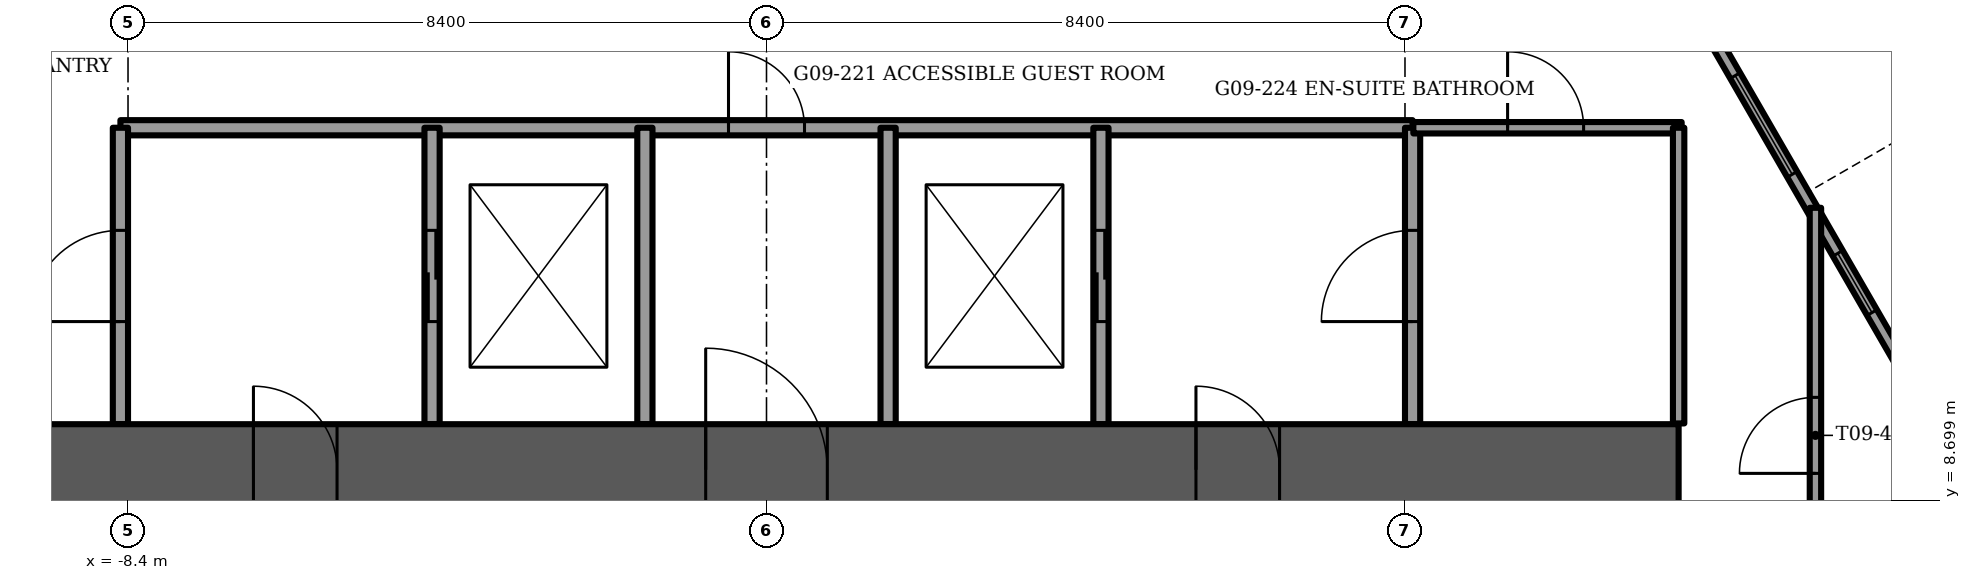
"""IFC4 building model, lengths in metres.
Left out: names, types, materials, properties, quantities, classifications, styles, units other than length and angle.
Written with IfcOpenShell. Run it as: python <this file> out.ifc"""

import sys

from ifc_helpers import new_model, si_unit, direction, frame, frame_2d, origin, place, context, subcontext, project, spatial, rectangle, extrude, element, fill, save


model = new_model("IFC4")
c1 = context("Model", 3, precision=1e-05, world=origin(), true_north=direction((0.0, 1.0)))
c2 = subcontext(c1, "Body", "Model", "MODEL_VIEW")
j1 = project(units=[si_unit("LENGTHUNIT", "METRE"), si_unit("PLANEANGLEUNIT", "RADIAN")], contexts=[c1])
p1 = place(None, origin())
s1 = spatial("IfcSite", under=j1, at=p1, CompositionType="ELEMENT")
p2 = place(p1, origin())
s2 = spatial("IfcBuilding", under=s1, at=p2, CompositionType="ELEMENT")
p3 = place(p2, frame((0.0, 0.0, 39.25)))
s3 = spatial("IfcBuildingStorey", under=s2, at=p3, CompositionType="ELEMENT", Elevation=39.25)
p4 = place(p3, frame((-12.0, 9.1, -0.3), z_axis=(0.0, 0.0, 1.0), x_axis=(1.0, 0.0, 0.0)))
e1 = element("IfcWall", 1, at=p4, inside=s3, PredefinedType="SHEAR", context=c2, shape_type="SweptSolid", body=[
    extrude(rectangle(XDim=24.0, YDim=1.2, at=frame_2d((12.0, 0.0))), origin(), (0.0, 0.0, 1.0), 3.75),
])
p5 = place(p4, frame((11.2, 0.0, 0.0)))
e2 = element("IfcOpeningElement", 2, at=p5, cuts=e1, PredefinedType="OPENING", context=c2, shape_type="SweptSolid", body=[
    extrude(rectangle(XDim=1.6, YDim=2.1, at=frame_2d((0.8, 1.05))), frame((0.0, 0.6, 0.0), z_axis=(0.0, -1.0, 0.0), x_axis=(1.0, 0.0, 0.0)), (0.0, 0.0, 1.0), 1.2),
])
p6 = place(p4, frame((5.25, 0.0, 0.0)))
e3 = element("IfcOpeningElement", 3, at=p6, cuts=e1, PredefinedType="OPENING", context=c2, shape_type="SweptSolid", body=[
    extrude(rectangle(XDim=1.1, YDim=2.1, at=frame_2d((0.55, 1.05))), frame((0.0, 0.6, 0.0), z_axis=(0.0, -1.0, 0.0), x_axis=(1.0, 0.0, 0.0)), (0.0, 0.0, 1.0), 1.2),
])
p7 = place(p4, frame((17.65, 0.0, 0.0)))
e4 = element("IfcOpeningElement", 4, at=p7, cuts=e1, PredefinedType="OPENING", context=c2, shape_type="SweptSolid", body=[
    extrude(rectangle(XDim=1.1, YDim=2.1, at=frame_2d((0.55, 1.05))), frame((0.0, 0.6, 0.0), z_axis=(0.0, -1.0, 0.0), x_axis=(1.0, 0.0, 0.0)), (0.0, 0.0, 1.0), 1.2),
])
p8 = place(p3, frame((15.844, 14.766, 0.0), z_axis=(0.0, 0.0, 1.0), x_axis=(-0.499994135611, 0.866028789565, 0.0)))
e5 = element("IfcWall", 5, at=p8, inside=s3, PredefinedType="PARAPET", context=c2, shape_type="SweptSolid", body=[
    extrude(rectangle(XDim=6.845, YDim=0.9, at=frame_2d((3.423, 0.0))), origin(), (0.0, 0.0, 1.0), 1.1),
])
p9 = place(p3, frame((-9.276, 20.292, 0.0), z_axis=(0.0, 0.0, 1.0), x_axis=(-0.500006057782, -0.866021906294, 0.0)))
e6 = element("IfcWall", 6, at=p9, inside=s3, PredefinedType="SOLIDWALL", context=c2, shape_type="SweptSolid", body=[
    extrude(rectangle(XDim=23.1, YDim=0.15, at=frame_2d((11.55, 0.0))), origin(), (0.0, 0.0, 1.0), 3.45),
])
p10 = place(p9, frame((2.736, 0.0, 0.15)))
e7 = element("IfcOpeningElement", 7, at=p10, cuts=e6, PredefinedType="OPENING", context=c2, shape_type="SweptSolid", body=[
    extrude(rectangle(XDim=0.9, YDim=2.85, at=frame_2d((0.45, 1.425))), frame((0.0, 0.075, 0.0), z_axis=(0.0, -1.0, 0.0), x_axis=(1.0, 0.0, 0.0)), (0.0, 0.0, 1.0), 0.15),
])
p11 = place(p9, frame((3.825, 0.0, 0.15)))
e8 = element("IfcOpeningElement", 8, at=p11, cuts=e6, PredefinedType="OPENING", context=c2, shape_type="SweptSolid", body=[
    extrude(rectangle(XDim=1.5, YDim=2.85, at=frame_2d((0.75, 1.425))), frame((0.0, 0.075, 0.0), z_axis=(0.0, -1.0, 0.0), x_axis=(1.0, 0.0, 0.0)), (0.0, 0.0, 1.0), 0.15),
])
p12 = place(p9, frame((9.32, 0.0, 0.15)))
e9 = element("IfcOpeningElement", 9, at=p12, cuts=e6, PredefinedType="OPENING", context=c2, shape_type="SweptSolid", body=[
    extrude(rectangle(XDim=0.9, YDim=2.85, at=frame_2d((0.45, 1.425))), frame((0.0, 0.075, 0.0), z_axis=(0.0, -1.0, 0.0), x_axis=(1.0, 0.0, 0.0)), (0.0, 0.0, 1.0), 0.15),
])
p13 = place(p9, frame((7.12, 0.0, 0.15)))
e10 = element("IfcOpeningElement", 10, at=p13, cuts=e6, PredefinedType="OPENING", context=c2, shape_type="SweptSolid", body=[
    extrude(rectangle(XDim=1.5, YDim=2.85, at=frame_2d((0.75, 1.425))), frame((0.0, 0.075, 0.0), z_axis=(0.0, -1.0, 0.0), x_axis=(1.0, 0.0, 0.0)), (0.0, 0.0, 1.0), 0.15),
])
p14 = place(p9, frame((11.136, 0.0, 0.15)))
e11 = element("IfcOpeningElement", 11, at=p14, cuts=e6, PredefinedType="OPENING", context=c2, shape_type="SweptSolid", body=[
    extrude(rectangle(XDim=1.8, YDim=2.85, at=frame_2d((0.9, 1.425))), frame((0.0, 0.075, 0.0), z_axis=(0.0, -1.0, 0.0), x_axis=(1.0, 0.0, 0.0)), (0.0, 0.0, 1.0), 0.15),
])
p15 = place(p9, frame((13.236, 0.0, 0.15)))
e12 = element("IfcOpeningElement", 12, at=p15, cuts=e6, PredefinedType="OPENING", context=c2, shape_type="SweptSolid", body=[
    extrude(rectangle(XDim=1.5, YDim=2.85, at=frame_2d((0.75, 1.425))), frame((0.0, 0.075, 0.0), z_axis=(0.0, -1.0, 0.0), x_axis=(1.0, 0.0, 0.0)), (0.0, 0.0, 1.0), 0.15),
])
p16 = place(p9, frame((16.18, 0.0, 0.15)))
e13 = element("IfcOpeningElement", 13, at=p16, cuts=e6, PredefinedType="OPENING", context=c2, shape_type="SweptSolid", body=[
    extrude(rectangle(XDim=1.5, YDim=2.85, at=frame_2d((0.75, 1.425))), frame((0.0, 0.075, 0.0), z_axis=(0.0, -1.0, 0.0), x_axis=(1.0, 0.0, 0.0)), (0.0, 0.0, 1.0), 0.15),
])
p17 = place(p9, frame((0.44, 0.0, 0.15)))
e14 = element("IfcOpeningElement", 14, at=p17, cuts=e6, PredefinedType="OPENING", context=c2, shape_type="SweptSolid", body=[
    extrude(rectangle(XDim=0.9, YDim=2.73, at=frame_2d((0.45, 1.365))), frame((0.0, 0.075, 0.0), z_axis=(0.0, -1.0, 0.0), x_axis=(1.0, 0.0, 0.0)), (0.0, 0.0, 1.0), 0.15),
])
p18 = place(p9, frame((20.978, 0.0, 0.15)))
e15 = element("IfcOpeningElement", 15, at=p18, cuts=e6, PredefinedType="OPENING", context=c2, shape_type="SweptSolid", body=[
    extrude(rectangle(XDim=1.8, YDim=2.73, at=frame_2d((0.9, 1.365))), frame((0.0, 0.075, 0.0), z_axis=(0.0, -1.0, 0.0), x_axis=(1.0, 0.0, 0.0)), (0.0, 0.0, 1.0), 0.15),
])
p19 = place(p3, frame((20.826, 0.287, 0.0), z_axis=(0.0, 0.0, 1.0), x_axis=(-0.500006057782, 0.866021906294, 0.0)))
e16 = element("IfcWall", 16, at=p19, inside=s3, PredefinedType="SOLIDWALL", context=c2, shape_type="SweptSolid", body=[
    extrude(rectangle(XDim=23.1, YDim=0.15, at=frame_2d((11.55, 0.0))), origin(), (0.0, 0.0, 1.0), 3.45),
])
p20 = place(p19, frame((4.165, 0.0, 0.15)))
e17 = element("IfcOpeningElement", 17, at=p20, cuts=e16, PredefinedType="OPENING", context=c2, shape_type="SweptSolid", body=[
    extrude(rectangle(XDim=0.9, YDim=2.85, at=frame_2d((0.45, 1.425))), frame((0.0, 0.075, 0.0), z_axis=(0.0, -1.0, 0.0), x_axis=(1.0, 0.0, 0.0)), (0.0, 0.0, 1.0), 0.15),
])
p21 = place(p19, frame((5.645, 0.0, 0.15)))
e18 = element("IfcOpeningElement", 18, at=p21, cuts=e16, PredefinedType="OPENING", context=c2, shape_type="SweptSolid", body=[
    extrude(rectangle(XDim=1.5, YDim=2.85, at=frame_2d((0.75, 1.425))), frame((0.0, 0.075, 0.0), z_axis=(0.0, -1.0, 0.0), x_axis=(1.0, 0.0, 0.0)), (0.0, 0.0, 1.0), 0.15),
])
p22 = place(p19, frame((8.365, 0.0, 0.15)))
e19 = element("IfcOpeningElement", 19, at=p22, cuts=e16, PredefinedType="OPENING", context=c2, shape_type="SweptSolid", body=[
    extrude(rectangle(XDim=1.8, YDim=2.85, at=frame_2d((0.9, 1.425))), frame((0.0, 0.075, 0.0), z_axis=(0.0, -1.0, 0.0), x_axis=(1.0, 0.0, 0.0)), (0.0, 0.0, 1.0), 0.15),
])
p23 = place(p19, frame((10.465, 0.0, 0.15)))
e20 = element("IfcOpeningElement", 20, at=p23, cuts=e16, PredefinedType="OPENING", context=c2, shape_type="SweptSolid", body=[
    extrude(rectangle(XDim=1.5, YDim=2.85, at=frame_2d((0.75, 1.425))), frame((0.0, 0.075, 0.0), z_axis=(0.0, -1.0, 0.0), x_axis=(1.0, 0.0, 0.0)), (0.0, 0.0, 1.0), 0.15),
])
p24 = place(p19, frame((12.564, 0.0, 0.15)))
e21 = element("IfcOpeningElement", 21, at=p24, cuts=e16, PredefinedType="OPENING", context=c2, shape_type="SweptSolid", body=[
    extrude(rectangle(XDim=0.9, YDim=2.85, at=frame_2d((0.45, 1.425))), frame((0.0, 0.075, 0.0), z_axis=(0.0, -1.0, 0.0), x_axis=(1.0, 0.0, 0.0)), (0.0, 0.0, 1.0), 0.15),
])
p25 = place(p19, frame((14.665, 0.0, 0.15)))
e22 = element("IfcOpeningElement", 22, at=p25, cuts=e16, PredefinedType="OPENING", context=c2, shape_type="SweptSolid", body=[
    extrude(rectangle(XDim=1.5, YDim=2.85, at=frame_2d((0.75, 1.425))), frame((0.0, 0.075, 0.0), z_axis=(0.0, -1.0, 0.0), x_axis=(1.0, 0.0, 0.0)), (0.0, 0.0, 1.0), 0.15),
])
p26 = place(p19, frame((17.775, 0.0, 0.15)))
e23 = element("IfcOpeningElement", 23, at=p26, cuts=e16, PredefinedType="OPENING", context=c2, shape_type="SweptSolid", body=[
    extrude(rectangle(XDim=0.9, YDim=2.85, at=frame_2d((0.45, 1.425))), frame((0.0, 0.075, 0.0), z_axis=(0.0, -1.0, 0.0), x_axis=(1.0, 0.0, 0.0)), (0.0, 0.0, 1.0), 0.15),
])
p27 = place(p19, frame((18.865, 0.0, 0.0)))
e24 = element("IfcOpeningElement", 24, at=p27, cuts=e16, PredefinedType="OPENING", context=c2, shape_type="SweptSolid", body=[
    extrude(rectangle(XDim=1.5, YDim=2.4, at=frame_2d((0.75, 1.2))), frame((0.0, 0.075, 0.0), z_axis=(0.0, -1.0, 0.0), x_axis=(1.0, 0.0, 0.0)), (0.0, 0.0, 1.0), 0.15),
])
p28 = place(p19, frame((0.322, 0.0, 0.15)))
e25 = element("IfcOpeningElement", 25, at=p28, cuts=e16, PredefinedType="OPENING", context=c2, shape_type="SweptSolid", body=[
    extrude(rectangle(XDim=1.8, YDim=2.73, at=frame_2d((0.9, 1.365))), frame((0.0, 0.075, 0.0), z_axis=(0.0, -1.0, 0.0), x_axis=(1.0, 0.0, 0.0)), (0.0, 0.0, 1.0), 0.15),
])
p29 = place(p19, frame((21.032, 0.0, 0.15)))
e26 = element("IfcOpeningElement", 26, at=p29, cuts=e16, PredefinedType="OPENING", context=c2, shape_type="SweptSolid", body=[
    extrude(rectangle(XDim=1.8, YDim=2.73, at=frame_2d((0.9, 1.365))), frame((0.0, 0.075, 0.0), z_axis=(0.0, -1.0, 0.0), x_axis=(1.0, 0.0, 0.0)), (0.0, 0.0, 1.0), 0.15),
])
p30 = place(p3, frame((-8.5, 13.6, 0.0), z_axis=(0.0, 0.0, 1.0), x_axis=(1.0, 0.0, 0.0)))
e27 = element("IfcWall", 27, at=p30, inside=s3, PredefinedType="PARTITIONING", context=c2, shape_type="SweptSolid", body=[
    extrude(rectangle(XDim=17.0, YDim=0.2, at=frame_2d((8.5, 0.0))), origin(), (0.0, 0.0, 1.0), 3.45),
])
p31 = place(p30, frame((8.0, 0.0, 0.0)))
e28 = element("IfcOpeningElement", 28, at=p31, cuts=e27, PredefinedType="OPENING", context=c2, shape_type="SweptSolid", body=[
    extrude(rectangle(XDim=1.0, YDim=2.1, at=frame_2d((0.5, 1.05))), frame((0.0, 0.1, 0.0), z_axis=(0.0, -1.0, 0.0), x_axis=(1.0, 0.0, 0.0)), (0.0, 0.0, 1.0), 0.2),
])
p32 = place(p3, frame((-8.5, 9.7, 0.0), z_axis=(0.0, 0.0, 1.0), x_axis=(0.0, 1.0, 0.0)))
e29 = element("IfcWall", 29, at=p32, inside=s3, PredefinedType="PARTITIONING", context=c2, shape_type="SweptSolid", body=[
    extrude(rectangle(XDim=3.9, YDim=0.2, at=frame_2d((1.95, 0.0))), origin(), (0.0, 0.0, 1.0), 3.45),
])
p33 = place(p32, frame((1.35, 0.0, 0.0)))
e30 = element("IfcOpeningElement", 30, at=p33, cuts=e29, PredefinedType="OPENING", context=c2, shape_type="SweptSolid", body=[
    extrude(rectangle(XDim=1.2, YDim=2.1, at=frame_2d((0.6, 1.05))), frame((0.0, 0.1, 0.0), z_axis=(0.0, -1.0, 0.0), x_axis=(1.0, 0.0, 0.0)), (0.0, 0.0, 1.0), 0.2),
])
p34 = place(p3, frame((8.5, 9.7, 0.0), z_axis=(0.0, 0.0, 1.0), x_axis=(0.0, 1.0, 0.0)))
e31 = element("IfcWall", 31, at=p34, inside=s3, PredefinedType="PARTITIONING", context=c2, shape_type="SweptSolid", body=[
    extrude(rectangle(XDim=3.9, YDim=0.2, at=frame_2d((1.95, 0.0))), origin(), (0.0, 0.0, 1.0), 3.45),
])
p35 = place(p34, frame((1.35, 0.0, 0.0)))
e32 = element("IfcOpeningElement", 32, at=p35, cuts=e31, PredefinedType="OPENING", context=c2, shape_type="SweptSolid", body=[
    extrude(rectangle(XDim=1.2, YDim=2.1, at=frame_2d((0.6, 1.05))), frame((0.0, 0.1, 0.0), z_axis=(0.0, -1.0, 0.0), x_axis=(1.0, 0.0, 0.0)), (0.0, 0.0, 1.0), 0.2),
])
p36 = place(p3, frame((-4.4, 9.7, 0.0), z_axis=(0.0, 0.0, 1.0), x_axis=(0.0, 1.0, 0.0)))
e33 = element("IfcWall", 33, at=p36, inside=s3, PredefinedType="PARTITIONING", context=c2, shape_type="SweptSolid", body=[
    extrude(rectangle(XDim=3.9, YDim=0.2, at=frame_2d((1.95, 0.0))), origin(), (0.0, 0.0, 1.0), 3.45),
])
p37 = place(p36, frame((1.35, 0.0, 0.0)))
e34 = element("IfcOpeningElement", 34, at=p37, cuts=e33, PredefinedType="OPENING", context=c2, shape_type="SweptSolid", body=[
    extrude(rectangle(XDim=1.2, YDim=2.1, at=frame_2d((0.6, 1.05))), frame((0.0, 0.1, 0.0), z_axis=(0.0, -1.0, 0.0), x_axis=(1.0, 0.0, 0.0)), (0.0, 0.0, 1.0), 0.2),
])
p38 = place(p3, frame((4.4, 9.7, 0.0), z_axis=(0.0, 0.0, 1.0), x_axis=(0.0, 1.0, 0.0)))
e35 = element("IfcWall", 35, at=p38, inside=s3, PredefinedType="PARTITIONING", context=c2, shape_type="SweptSolid", body=[
    extrude(rectangle(XDim=3.9, YDim=0.2, at=frame_2d((1.95, 0.0))), origin(), (0.0, 0.0, 1.0), 3.45),
])
p39 = place(p38, frame((1.35, 0.0, 0.0)))
e36 = element("IfcOpeningElement", 36, at=p39, cuts=e35, PredefinedType="OPENING", context=c2, shape_type="SweptSolid", body=[
    extrude(rectangle(XDim=1.2, YDim=2.1, at=frame_2d((0.6, 1.05))), frame((0.0, 0.1, 0.0), z_axis=(0.0, -1.0, 0.0), x_axis=(1.0, 0.0, 0.0)), (0.0, 0.0, 1.0), 0.2),
])
for number, where, z_axis, x_axis in (
    (37, (-1.6, 9.7, 0.0), (0.0, 0.0, 1.0), (0.0, 1.0, 0.0)),
    (38, (1.6, 9.7, 0.0), (0.0, 0.0, 1.0), (0.0, 1.0, 0.0)),
):
    element("IfcWall", number, at=place(p3, frame(where, z_axis=z_axis, x_axis=x_axis)), inside=s3, PredefinedType="PARTITIONING", context=c2, shape_type="SweptSolid", body=[
        extrude(rectangle(XDim=3.9, YDim=0.2, at=frame_2d((1.95, 0.0))), origin(), (0.0, 0.0, 1.0), 3.45),
    ])
p40 = place(p3, frame((8.51, 13.6, 0.0), z_axis=(0.0, 0.0, 1.0), x_axis=(1.0, 0.0, 0.0)))
e39 = element("IfcWall", 39, at=p40, inside=s3, PredefinedType="PARTITIONING", context=c2, shape_type="SweptSolid", body=[
    extrude(rectangle(XDim=3.53, YDim=0.15, at=frame_2d((1.765, 0.0))), origin(), (0.0, 0.0, 1.0), 3.45),
])
p41 = place(p40, frame((1.24, 0.0, 0.0)))
e40 = element("IfcOpeningElement", 40, at=p41, cuts=e39, PredefinedType="OPENING", context=c2, shape_type="SweptSolid", body=[
    extrude(rectangle(XDim=1.0, YDim=2.1, at=frame_2d((0.5, 1.05))), frame((0.0, 0.075, 0.0), z_axis=(0.0, -1.0, 0.0), x_axis=(1.0, 0.0, 0.0)), (0.0, 0.0, 1.0), 0.15),
])
p42 = place(p3, frame((13.8, -3.7, 0.0), z_axis=(0.0, 0.0, 1.0), x_axis=(0.0, 1.0, 0.0)))
e41 = element("IfcWall", 41, at=p42, inside=s3, PredefinedType="PARTITIONING", context=c2, shape_type="SweptSolid", body=[
    extrude(rectangle(XDim=16.247, YDim=0.15, at=frame_2d((8.124, 0.0))), origin(), (0.0, 0.0, 1.0), 3.45),
])
p43 = place(p42, frame((1.705, 0.0, 0.0)))
e42 = element("IfcOpeningElement", 42, at=p43, cuts=e41, PredefinedType="OPENING", context=c2, shape_type="SweptSolid", body=[
    extrude(rectangle(XDim=1.0, YDim=2.1, at=frame_2d((0.5, 1.05))), frame((0.0, 0.075, 0.0), z_axis=(0.0, -1.0, 0.0), x_axis=(1.0, 0.0, 0.0)), (0.0, 0.0, 1.0), 0.15),
])
p44 = place(p42, frame((7.9, 0.0, 0.0)))
e43 = element("IfcOpeningElement", 43, at=p44, cuts=e41, PredefinedType="OPENING", context=c2, shape_type="SweptSolid", body=[
    extrude(rectangle(XDim=1.0, YDim=2.1, at=frame_2d((0.5, 1.05))), frame((0.0, 0.075, 0.0), z_axis=(0.0, -1.0, 0.0), x_axis=(1.0, 0.0, 0.0)), (0.0, 0.0, 1.0), 0.15),
])
p45 = place(p42, frame((12.753, 0.0, 0.0)))
e44 = element("IfcOpeningElement", 44, at=p45, cuts=e41, PredefinedType="OPENING", context=c2, shape_type="SweptSolid", body=[
    extrude(rectangle(XDim=1.0, YDim=2.1, at=frame_2d((0.5, 1.05))), frame((0.0, 0.075, 0.0), z_axis=(0.0, -1.0, 0.0), x_axis=(1.0, 0.0, 0.0)), (0.0, 0.0, 1.0), 0.15),
])
p46 = place(p3, frame((12.0, 9.71, 0.0), z_axis=(0.0, 0.0, 1.0), x_axis=(0.0, 1.0, 0.0)))
e45 = element("IfcWall", 45, at=p46, inside=s3, PredefinedType="PARTITIONING", context=c2, shape_type="SweptSolid", body=[
    extrude(rectangle(XDim=3.89, YDim=0.15, at=frame_2d((1.945, 0.0))), origin(), (0.0, 0.0, 1.0), 3.45),
])
p47 = place(p24, origin())
e46 = element("IfcWindow", 46, at=p47, inside=s3, PartitioningType="SINGLE_PANEL", PredefinedType="WINDOW", context=c2, shape_type="SweptSolid", body=[
    extrude(rectangle(XDim=0.9, YDim=2.85, at=frame_2d((0.45, 1.425))), frame((0.0, 0.03, 0.0), z_axis=(0.0, -1.0, 0.0), x_axis=(1.0, 0.0, 0.0)), (0.0, 0.0, 1.0), 0.06),
])
fill(e21, e46)
p48 = place(p25, origin())
e47 = element("IfcWindow", 47, at=p48, inside=s3, PartitioningType="SINGLE_PANEL", PredefinedType="WINDOW", context=c2, shape_type="SweptSolid", body=[
    extrude(rectangle(XDim=1.5, YDim=2.85, at=frame_2d((0.75, 1.425))), frame((0.0, 0.03, 0.0), z_axis=(0.0, -1.0, 0.0), x_axis=(1.0, 0.0, 0.0)), (0.0, 0.0, 1.0), 0.06),
])
fill(e22, e47)
p49 = place(p5, origin())
e48 = element("IfcDoor", 48, at=p49, inside=s3, OperationType="DOUBLE_DOOR_SINGLE_SWING", PredefinedType="DOOR", context=c2, shape_type="SweptSolid", body=[
    extrude(rectangle(XDim=1.6, YDim=2.1, at=frame_2d((0.8, 1.05))), frame((0.0, 0.025, 0.0), z_axis=(0.0, -1.0, 0.0), x_axis=(1.0, 0.0, 0.0)), (0.0, 0.0, 1.0), 0.05),
])
fill(e2, e48)
p50 = place(p6, origin())
e49 = element("IfcDoor", 49, at=p50, inside=s3, OperationType="SINGLE_SWING_LEFT", PredefinedType="DOOR", context=c2, shape_type="SweptSolid", body=[
    extrude(rectangle(XDim=1.1, YDim=2.1, at=frame_2d((0.55, 1.05))), frame((0.0, 0.025, 0.0), z_axis=(0.0, -1.0, 0.0), x_axis=(1.0, 0.0, 0.0)), (0.0, 0.0, 1.0), 0.05),
])
fill(e3, e49)
p51 = place(p7, origin())
e50 = element("IfcDoor", 50, at=p51, inside=s3, OperationType="SINGLE_SWING_RIGHT", PredefinedType="DOOR", context=c2, shape_type="SweptSolid", body=[
    extrude(rectangle(XDim=1.1, YDim=2.1, at=frame_2d((0.55, 1.05))), frame((0.0, 0.025, 0.0), z_axis=(0.0, -1.0, 0.0), x_axis=(1.0, 0.0, 0.0)), (0.0, 0.0, 1.0), 0.05),
])
fill(e4, e50)
p52 = place(p37, origin())
e51 = element("IfcDoor", 51, at=p52, inside=s3, OperationType="SLIDING_TO_LEFT", PredefinedType="DOOR", context=c2, shape_type="SweptSolid", body=[
    extrude(rectangle(XDim=1.2, YDim=2.1, at=frame_2d((0.6, 1.05))), frame((0.0, 0.025, 0.0), z_axis=(0.0, -1.0, 0.0), x_axis=(1.0, 0.0, 0.0)), (0.0, 0.0, 1.0), 0.05),
])
fill(e34, e51)
p53 = place(p33, origin())
e52 = element("IfcDoor", 52, at=p53, inside=s3, OperationType="SINGLE_SWING_LEFT", PredefinedType="DOOR", context=c2, shape_type="SweptSolid", body=[
    extrude(rectangle(XDim=1.2, YDim=2.1, at=frame_2d((0.6, 1.05))), frame((0.0, 0.025, 0.0), z_axis=(0.0, -1.0, 0.0), x_axis=(1.0, 0.0, 0.0)), (0.0, 0.0, 1.0), 0.05),
])
fill(e30, e52)
p54 = place(p39, origin())
e53 = element("IfcDoor", 53, at=p54, inside=s3, OperationType="SLIDING_TO_LEFT", PredefinedType="DOOR", context=c2, shape_type="SweptSolid", body=[
    extrude(rectangle(XDim=1.2, YDim=2.1, at=frame_2d((0.6, 1.05))), frame((0.0, 0.025, 0.0), z_axis=(0.0, -1.0, 0.0), x_axis=(1.0, 0.0, 0.0)), (0.0, 0.0, 1.0), 0.05),
])
fill(e36, e53)
p55 = place(p35, origin())
e54 = element("IfcDoor", 54, at=p55, inside=s3, OperationType="SINGLE_SWING_LEFT", PredefinedType="DOOR", context=c2, shape_type="SweptSolid", body=[
    extrude(rectangle(XDim=1.2, YDim=2.1, at=frame_2d((0.6, 1.05))), frame((0.0, 0.025, 0.0), z_axis=(0.0, -1.0, 0.0), x_axis=(1.0, 0.0, 0.0)), (0.0, 0.0, 1.0), 0.05),
])
fill(e32, e54)
p56 = place(p31, origin())
e55 = element("IfcDoor", 55, at=p56, inside=s3, OperationType="SINGLE_SWING_LEFT", PredefinedType="DOOR", context=c2, shape_type="SweptSolid", body=[
    extrude(rectangle(XDim=1.0, YDim=2.1, at=frame_2d((0.5, 1.05))), frame((0.0, 0.025, 0.0), z_axis=(0.0, -1.0, 0.0), x_axis=(1.0, 0.0, 0.0)), (0.0, 0.0, 1.0), 0.05),
])
fill(e28, e55)
p57 = place(p45, origin())
e56 = element("IfcDoor", 56, at=p57, inside=s3, OperationType="SINGLE_SWING_LEFT", PredefinedType="DOOR", context=c2, shape_type="SweptSolid", body=[
    extrude(rectangle(XDim=1.0, YDim=2.1, at=frame_2d((0.5, 1.05))), frame((0.0, 0.025, 0.0), z_axis=(0.0, -1.0, 0.0), x_axis=(1.0, 0.0, 0.0)), (0.0, 0.0, 1.0), 0.05),
])
fill(e44, e56)
p58 = place(p41, origin())
e57 = element("IfcDoor", 57, at=p58, inside=s3, OperationType="SINGLE_SWING_LEFT", PredefinedType="DOOR", context=c2, shape_type="SweptSolid", body=[
    extrude(rectangle(XDim=1.0, YDim=2.1, at=frame_2d((0.5, 1.05))), frame((0.0, 0.025, 0.0), z_axis=(0.0, -1.0, 0.0), x_axis=(1.0, 0.0, 0.0)), (0.0, 0.0, 1.0), 0.05),
])
fill(e40, e57)
save(model, sys.argv[1])
